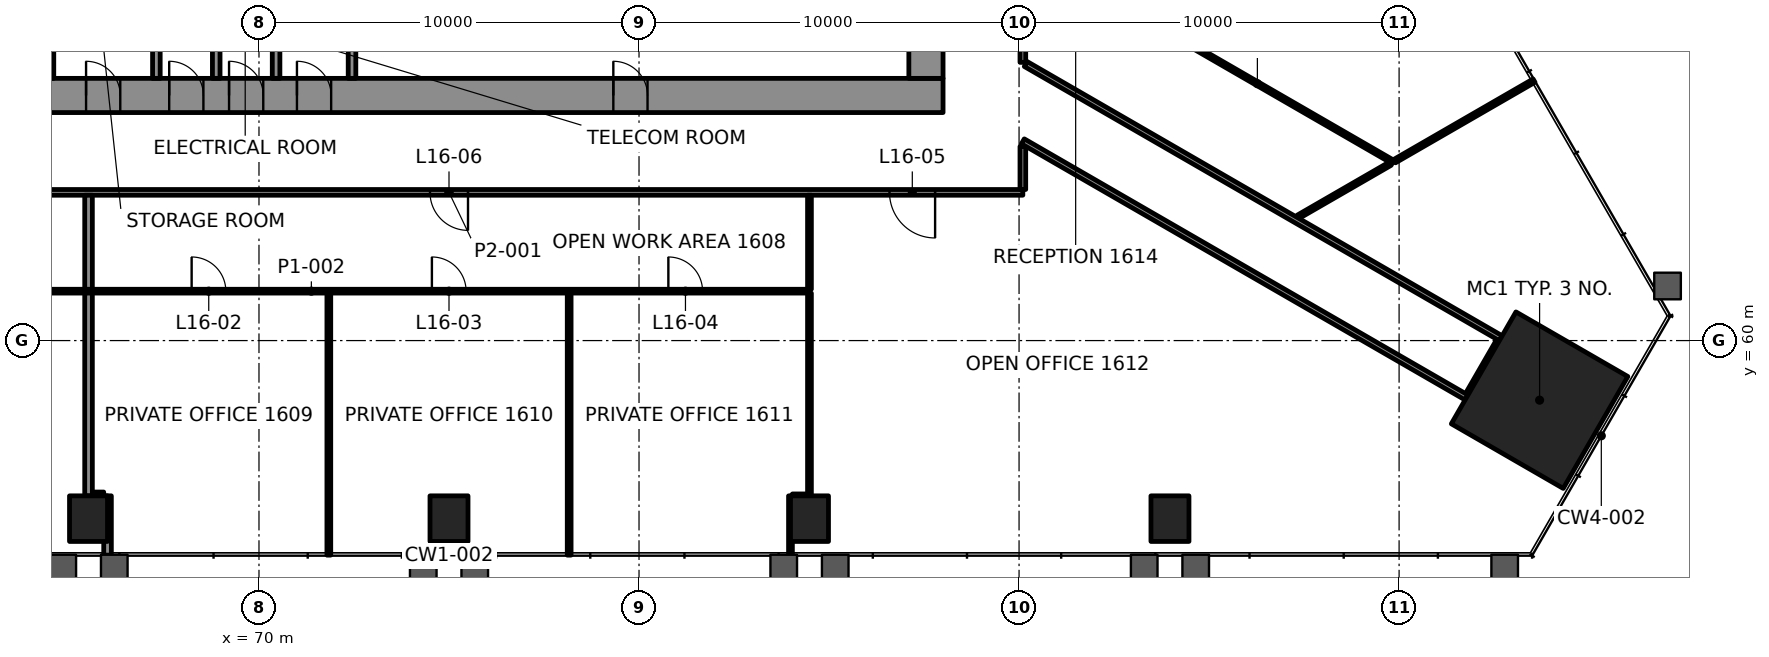
"""IFC4 building model, lengths in metres.
Left out: names, types, materials, properties, quantities, classifications, styles, units other than length and angle.
Written with IfcOpenShell. Run it as: python <this file> out.ifc"""

import sys

from ifc_helpers import new_model, si_unit, direction, frame, frame_2d, origin, origin_2d, place, context, subcontext, project, spatial, rectangle, extrude, element, fill, save


model = new_model("IFC4")
c1 = context("Model", 3, precision=1e-05, world=origin(), true_north=direction((0.0, 1.0)))
c2 = subcontext(c1, "Body", "Model", "MODEL_VIEW")
j1 = project(units=[si_unit("LENGTHUNIT", "METRE"), si_unit("PLANEANGLEUNIT", "RADIAN")], contexts=[c1])
p1 = place(None, origin())
s1 = spatial("IfcSite", under=j1, at=p1, CompositionType="ELEMENT")
p2 = place(p1, origin())
s2 = spatial("IfcBuilding", under=s1, at=p2, CompositionType="ELEMENT")
p3 = place(p2, frame((0.0, 0.0, 73.6)))
s3 = spatial("IfcBuildingStorey", under=s2, at=p3, CompositionType="ELEMENT", Elevation=73.6)
p4 = place(p3, frame((103.697, 58.432, 0.0), z_axis=(0.0, 0.0, 1.0), x_axis=(0.5, 0.866025403784, 0.0)))
e1 = element("IfcColumn", 1, at=p4, inside=s3, PredefinedType="COLUMN", context=c2, shape_type="SweptSolid", body=[
    extrude(rectangle(XDim=3.4, YDim=3.4, at=origin_2d()), origin(), (0.0, 0.0, 1.0), 4.2),
])
for number, where, z_axis, x_axis in (
    (2, (65.515, 55.314, -0.0), (0.0, 0.0, 1.0), (1.0, 0.0, 0.0)),
    (3, (75.0, 55.314, -0.0), (0.0, 0.0, 1.0), (1.0, 0.0, 0.0)),
    (4, (84.485, 55.314, -0.0), (0.0, 0.0, 1.0), (1.0, 0.0, 0.0)),
    (5, (93.971, 55.314, -0.0), (0.0, 0.0, 1.0), (1.0, 0.0, 0.0)),
):
    element("IfcColumn", number, at=place(p3, frame(where, z_axis=z_axis, x_axis=x_axis)), inside=s3, PredefinedType="COLUMN", context=c2, shape_type="SweptSolid", body=[
        extrude(rectangle(XDim=1.0, YDim=1.2, at=origin_2d()), origin(), (0.0, 0.0, 1.0), 4.2),
    ])
p5 = place(p3, frame((62.0, 66.45, 0.0), z_axis=(0.0, 0.0, 1.0), x_axis=(1.0, 0.0, 0.0)))
e6 = element("IfcWall", 6, at=p5, inside=s3, PredefinedType="SHEAR", context=c2, shape_type="SweptSolid", body=[
    extrude(rectangle(XDim=26.0, YDim=0.9, at=frame_2d((13.0, 0.0))), origin(), (0.0, 0.0, 1.0), 4.0),
])
p6 = place(p5, frame((3.45, 0.0, 0.0)))
e7 = element("IfcOpeningElement", 7, at=p6, cuts=e6, PredefinedType="OPENING", context=c2, shape_type="SweptSolid", body=[
    extrude(rectangle(XDim=0.9, YDim=2.1, at=frame_2d((0.45, 1.05))), frame((0.0, 0.46, 0.0), z_axis=(0.0, -1.0, 0.0), x_axis=(1.0, 0.0, 0.0)), (0.0, 0.0, 1.0), 0.92),
])
p7 = place(p5, frame((5.637, 0.0, 0.0)))
e8 = element("IfcOpeningElement", 8, at=p7, cuts=e6, PredefinedType="OPENING", context=c2, shape_type="SweptSolid", body=[
    extrude(rectangle(XDim=0.9, YDim=2.1, at=frame_2d((0.45, 1.05))), frame((0.0, 0.46, 0.0), z_axis=(0.0, -1.0, 0.0), x_axis=(1.0, 0.0, 0.0)), (0.0, 0.0, 1.0), 0.92),
])
p8 = place(p5, frame((7.212, 0.0, 0.0)))
e9 = element("IfcOpeningElement", 9, at=p8, cuts=e6, PredefinedType="OPENING", context=c2, shape_type="SweptSolid", body=[
    extrude(rectangle(XDim=0.9, YDim=2.1, at=frame_2d((0.45, 1.05))), frame((0.0, 0.46, 0.0), z_axis=(0.0, -1.0, 0.0), x_axis=(1.0, 0.0, 0.0)), (0.0, 0.0, 1.0), 0.92),
])
p9 = place(p5, frame((8.999, 0.0, 0.0)))
e10 = element("IfcOpeningElement", 10, at=p9, cuts=e6, PredefinedType="OPENING", context=c2, shape_type="SweptSolid", body=[
    extrude(rectangle(XDim=0.9, YDim=2.1, at=frame_2d((0.45, 1.05))), frame((0.0, 0.46, 0.0), z_axis=(0.0, -1.0, 0.0), x_axis=(1.0, 0.0, 0.0)), (0.0, 0.0, 1.0), 0.92),
])
p10 = place(p5, frame((17.324, 0.0, 0.0)))
e11 = element("IfcOpeningElement", 11, at=p10, cuts=e6, PredefinedType="OPENING", context=c2, shape_type="SweptSolid", body=[
    extrude(rectangle(XDim=0.9, YDim=2.1, at=frame_2d((0.45, 1.05))), frame((0.0, 0.46, 0.0), z_axis=(0.0, -1.0, 0.0), x_axis=(1.0, 0.0, 0.0)), (0.0, 0.0, 1.0), 0.92),
])
p11 = place(p3, frame((87.55, 66.9, 0.0), z_axis=(0.0, 0.0, 1.0), x_axis=(0.0, 1.0, 0.0)))
e12 = element("IfcWall", 12, at=p11, inside=s3, PredefinedType="SHEAR", context=c2, shape_type="SweptSolid", body=[
    extrude(rectangle(XDim=16.2, YDim=0.9, at=frame_2d((8.1, 0.0))), origin(), (0.0, 0.0, 1.0), 4.0),
])
p12 = place(p11, frame((5.5, 0.0, 0.0)))
e13 = element("IfcOpeningElement", 13, at=p12, cuts=e12, PredefinedType="OPENING", context=c2, shape_type="SweptSolid", body=[
    extrude(rectangle(XDim=1.8, YDim=2.1, at=frame_2d((0.9, 1.05))), frame((0.0, 0.46, 0.0), z_axis=(0.0, -1.0, 0.0), x_axis=(1.0, 0.0, 0.0)), (0.0, 0.0, 1.0), 0.92),
])
p13 = place(p11, frame((11.202, 0.0, 0.0)))
e14 = element("IfcOpeningElement", 14, at=p13, cuts=e12, PredefinedType="OPENING", context=c2, shape_type="SweptSolid", body=[
    extrude(rectangle(XDim=0.9, YDim=2.1, at=frame_2d((0.45, 1.05))), frame((0.0, 0.46, 0.0), z_axis=(0.0, -1.0, 0.0), x_axis=(1.0, 0.0, 0.0)), (0.0, 0.0, 1.0), 0.92),
])
p14 = place(p3, frame((65.625, 55.914, 0.0), z_axis=(0.0, 0.0, 1.0), x_axis=(1.0, 0.0, 0.0)))
e15 = element("IfcWall", 15, at=p14, inside=s3, PredefinedType="PARTITIONING", context=c2, shape_type="SweptSolid", body=[
    extrude(rectangle(XDim=0.29, YDim=0.2, at=frame_2d((0.145, 0.0))), origin(), (0.0, 0.0, 1.0), 3.4),
])
p15 = place(p3, frame((84.036, 55.914, 0.0), z_axis=(0.0, 0.0, 1.0), x_axis=(1.0, 0.0, 0.0)))
e16 = element("IfcWall", 16, at=p15, inside=s3, PredefinedType="PARTITIONING", context=c2, shape_type="SweptSolid", body=[
    extrude(rectangle(XDim=0.399, YDim=0.1, at=frame_2d((0.199, 0.0))), origin(), (0.0, 0.0, 1.0), 3.4),
])
p16 = place(p3, frame((58.271, 61.3, 0.0), z_axis=(0.0, 0.0, 1.0), x_axis=(1.0, 0.0, 0.0)))
e17 = element("IfcWall", 17, at=p16, inside=s3, PredefinedType="PARTITIONING", context=c2, shape_type="SweptSolid", body=[
    extrude(rectangle(XDim=26.214, YDim=0.1, at=frame_2d((13.107, 0.0))), origin(), (0.0, 0.0, 1.0), 3.4),
])
p17 = place(p16, frame((3.122, 0.0, 0.0)))
e18 = element("IfcOpeningElement", 18, at=p17, cuts=e17, PredefinedType="OPENING", context=c2, shape_type="SweptSolid", body=[
    extrude(rectangle(XDim=1.2, YDim=2.1, at=frame_2d((0.6, 1.05))), frame((0.0, 0.06, 0.0), z_axis=(0.0, -1.0, 0.0), x_axis=(1.0, 0.0, 0.0)), (0.0, 0.0, 1.0), 0.12),
])
p18 = place(p16, frame((9.957, 0.0, 0.0)))
e19 = element("IfcOpeningElement", 19, at=p18, cuts=e17, PredefinedType="OPENING", context=c2, shape_type="SweptSolid", body=[
    extrude(rectangle(XDim=0.9, YDim=2.1, at=frame_2d((0.45, 1.05))), frame((0.0, 0.06, 0.0), z_axis=(0.0, -1.0, 0.0), x_axis=(1.0, 0.0, 0.0)), (0.0, 0.0, 1.0), 0.12),
])
p19 = place(p16, frame((16.279, 0.0, 0.0)))
e20 = element("IfcOpeningElement", 20, at=p19, cuts=e17, PredefinedType="OPENING", context=c2, shape_type="SweptSolid", body=[
    extrude(rectangle(XDim=0.9, YDim=2.1, at=frame_2d((0.45, 1.05))), frame((0.0, 0.06, 0.0), z_axis=(0.0, -1.0, 0.0), x_axis=(1.0, 0.0, 0.0)), (0.0, 0.0, 1.0), 0.12),
])
p20 = place(p16, frame((22.501, 0.0, 0.0)))
e21 = element("IfcOpeningElement", 21, at=p20, cuts=e17, PredefinedType="OPENING", context=c2, shape_type="SweptSolid", body=[
    extrude(rectangle(XDim=0.9, YDim=2.1, at=frame_2d((0.45, 1.05))), frame((0.0, 0.06, 0.0), z_axis=(0.0, -1.0, 0.0), x_axis=(1.0, 0.0, 0.0)), (0.0, 0.0, 1.0), 0.12),
])
p21 = place(p3, frame((90.099, 63.9, 0.0), z_axis=(0.0, 0.0, 1.0), x_axis=(-1.0, 0.0, 0.0)))
e22 = element("IfcWall", 22, at=p21, inside=s3, PredefinedType="PARTITIONING", context=c2, shape_type="SweptSolid", body=[
    extrude(rectangle(XDim=30.199, YDim=0.15, at=frame_2d((15.1, 0.0))), origin(), (0.0, 0.0, 1.0), 3.4),
])
p22 = place(p21, frame((2.309, 0.0, 0.0)))
e23 = element("IfcOpeningElement", 23, at=p22, cuts=e22, PredefinedType="OPENING", context=c2, shape_type="SweptSolid", body=[
    extrude(rectangle(XDim=1.2, YDim=2.1, at=frame_2d((0.6, 1.05))), frame((0.0, 0.085, 0.0), z_axis=(0.0, -1.0, 0.0), x_axis=(1.0, 0.0, 0.0)), (0.0, 0.0, 1.0), 0.17),
])
p23 = place(p21, frame((14.599, 0.0, 0.0)))
e24 = element("IfcOpeningElement", 24, at=p23, cuts=e22, PredefinedType="OPENING", context=c2, shape_type="SweptSolid", body=[
    extrude(rectangle(XDim=1.0, YDim=2.1, at=frame_2d((0.5, 1.05))), frame((0.0, 0.085, 0.0), z_axis=(0.0, -1.0, 0.0), x_axis=(1.0, 0.0, 0.0)), (0.0, 0.0, 1.0), 0.17),
])
p24 = place(p21, frame((26.791, 0.0, 0.0)))
e25 = element("IfcOpeningElement", 25, at=p24, cuts=e22, PredefinedType="OPENING", context=c2, shape_type="SweptSolid", body=[
    extrude(rectangle(XDim=1.0, YDim=2.1, at=frame_2d((0.5, 1.05))), frame((0.0, 0.085, 0.0), z_axis=(0.0, -1.0, 0.0), x_axis=(1.0, 0.0, 0.0)), (0.0, 0.0, 1.0), 0.17),
])
p25 = place(p3, frame((97.343, 63.256, 0.0), z_axis=(0.0, 0.0, 1.0), x_axis=(0.866028733576, 0.499994232587, 0.0)))
e26 = element("IfcWall", 26, at=p25, inside=s3, PredefinedType="PARTITIONING", context=c2, shape_type="SweptSolid", body=[
    extrude(rectangle(XDim=2.799, YDim=0.1, at=frame_2d((1.4, 0.0))), origin(), (0.0, 0.0, 1.0), 3.4),
])
p26 = place(p3, frame((101.812, 58.568, 0.0), z_axis=(0.0, 0.0, 1.0), x_axis=(0.499944585209, 0.866057395165, 0.0)))
e27 = element("IfcWall", 27, at=p26, inside=s3, PredefinedType="PARTITIONING", context=c2, shape_type="SweptSolid", body=[
    extrude(rectangle(XDim=1.649, YDim=0.15, at=frame_2d((0.825, 0.0))), origin(), (0.0, 0.0, 1.0), 3.247),
])
p27 = place(p3, frame((90.1, 63.976, 0.0), z_axis=(0.0, 0.0, 1.0), x_axis=(0.0, 1.0, 0.0)))
e28 = element("IfcWall", 28, at=p27, inside=s3, PredefinedType="PARTITIONING", context=c2, shape_type="SweptSolid", body=[
    extrude(rectangle(XDim=1.131, YDim=0.15, at=frame_2d((0.565, 0.0))), origin(), (0.0, 0.0, 1.0), 3.247),
])
p28 = place(p3, frame((90.1, 86.099, 0.0), z_axis=(0.0, 0.0, 1.0), x_axis=(0.0, -1.0, 0.0)))
e29 = element("IfcWall", 29, at=p28, inside=s3, PredefinedType="PARTITIONING", context=c2, shape_type="SweptSolid", body=[
    extrude(rectangle(XDim=18.778, YDim=0.15, at=frame_2d((9.389, 0.0))), origin(), (0.0, 0.0, 1.0), 3.4),
])
p29 = place(p28, frame((15.455, 0.0, 0.0)))
e30 = element("IfcOpeningElement", 30, at=p29, cuts=e29, PredefinedType="OPENING", context=c2, shape_type="SweptSolid", body=[
    extrude(rectangle(XDim=1.0, YDim=2.1, at=frame_2d((0.5, 1.05))), frame((0.0, 0.085, 0.0), z_axis=(0.0, -1.0, 0.0), x_axis=(1.0, 0.0, 0.0)), (0.0, 0.0, 1.0), 0.17),
])
p30 = place(p3, frame((84.485, 55.915, 0.0), z_axis=(0.0, 0.0, 1.0), x_axis=(0.0, 1.0, 0.0)))
e31 = element("IfcWall", 31, at=p30, inside=s3, PredefinedType="PARTITIONING", context=c2, shape_type="SweptSolid", body=[
    extrude(rectangle(XDim=5.335, YDim=0.1, at=frame_2d((2.668, 0.0))), origin(), (0.0, 0.0, 1.0), 3.4),
])
p31 = place(p3, frame((83.985, 54.354, 0.0), z_axis=(0.0, 0.0, 1.0), x_axis=(0.0, 1.0, 0.0)))
e32 = element("IfcWall", 32, at=p31, inside=s3, PredefinedType="PARTITIONING", context=c2, shape_type="SweptSolid", body=[
    extrude(rectangle(XDim=1.56, YDim=0.1, at=frame_2d((0.78, 0.0))), origin(), (0.0, 0.0, 1.0), 3.165),
])
for number, where, z_axis, x_axis in (
    (33, (78.162, 54.354, 0.0), (0.0, 0.0, 1.0), (0.0, 1.0, 0.0)),
    (34, (71.838, 54.354, 0.0), (0.0, 0.0, 1.0), (0.0, 1.0, 0.0)),
):
    element("IfcWall", number, at=place(p3, frame(where, z_axis=z_axis, x_axis=x_axis)), inside=s3, PredefinedType="PARTITIONING", context=c2, shape_type="SweptSolid", body=[
        extrude(rectangle(XDim=6.896, YDim=0.1, at=frame_2d((3.448, 0.0))), origin(), (0.0, 0.0, 1.0), 3.165),
    ])
p32 = place(p3, frame((66.015, 54.354, 0.0), z_axis=(0.0, 0.0, 1.0), x_axis=(0.0, 1.0, 0.0)))
e35 = element("IfcWall", 35, at=p32, inside=s3, PredefinedType="PARTITIONING", context=c2, shape_type="SweptSolid", body=[
    extrude(rectangle(XDim=1.56, YDim=0.2, at=frame_2d((0.78, 0.0))), origin(), (0.0, 0.0, 1.0), 3.165),
])
p33 = place(p3, frame((65.515, 55.914, 0.0), z_axis=(0.0, 0.0, 1.0), x_axis=(0.0, 1.0, 0.0)))
e36 = element("IfcWall", 36, at=p33, inside=s3, PredefinedType="PARTITIONING", context=c2, shape_type="SweptSolid", body=[
    extrude(rectangle(XDim=5.336, YDim=0.2, at=frame_2d((2.668, 0.0))), origin(), (0.0, 0.0, 1.0), 3.4),
])
p34 = place(p3, frame((99.842, 64.699, 0.0), z_axis=(0.0, 0.0, 1.0), x_axis=(-0.866022901237, 0.500004334515, 0.0)))
e37 = element("IfcWall", 37, at=p34, inside=s3, PredefinedType="PARTITIONING", context=c2, shape_type="SweptSolid", body=[
    extrude(rectangle(XDim=8.247, YDim=0.1, at=frame_2d((4.124, 0.0))), origin(), (0.0, 0.0, 1.0), 3.4),
])
p35 = place(p3, frame((102.674, 60.062, 0.0), z_axis=(0.0, 0.0, 1.0), x_axis=(-0.866022486604, 0.50000505267, 0.0)))
e38 = element("IfcWall", 38, at=p35, inside=s3, PredefinedType="PARTITIONING", context=c2, shape_type="SweptSolid", body=[
    extrude(rectangle(XDim=14.433, YDim=0.15, at=frame_2d((7.216, 0.0))), origin(), (0.0, 0.0, 1.0), 3.4),
])
p36 = place(p3, frame((101.774, 58.503, 0.0), z_axis=(0.0, 0.0, 1.0), x_axis=(-0.866023326939, 0.500003597184, 0.0)))
e39 = element("IfcWall", 39, at=p36, inside=s3, PredefinedType="PARTITIONING", context=c2, shape_type="SweptSolid", body=[
    extrude(rectangle(XDim=13.48, YDim=0.15, at=frame_2d((6.74, 0.0))), origin(), (0.0, 0.0, 1.0), 3.247),
])
p37 = place(p3, frame((84.485, 61.35, 0.0), z_axis=(0.0, 0.0, 1.0), x_axis=(0.0, 1.0, 0.0)))
e40 = element("IfcWall", 40, at=p37, inside=s3, PredefinedType="PARTITIONING", context=c2, shape_type="SweptSolid", body=[
    extrude(rectangle(XDim=2.475, YDim=0.1, at=frame_2d((1.237, 0.0))), origin(), (0.0, 0.0, 1.0), 3.4),
])
p38 = place(p3, frame((99.879, 64.721, 0.0), z_axis=(0.0, 0.0, 1.0), x_axis=(0.866030225258, 0.499991648869, 0.0)))
e41 = element("IfcWall", 41, at=p38, inside=s3, PredefinedType="PARTITIONING", context=c2, shape_type="SweptSolid", body=[
    extrude(rectangle(XDim=4.239, YDim=0.1, at=frame_2d((2.12, 0.0))), origin(), (0.0, 0.0, 1.0), 3.4),
])
p39 = place(p3, frame((65.515, 61.35, 0.0), z_axis=(0.0, 0.0, 1.0), x_axis=(0.0, 1.0, 0.0)))
e42 = element("IfcWall", 42, at=p39, inside=s3, PredefinedType="PARTITIONING", context=c2, shape_type="SweptSolid", body=[
    extrude(rectangle(XDim=2.475, YDim=0.2, at=frame_2d((1.237, 0.0))), origin(), (0.0, 0.0, 1.0), 3.4),
])
for number, where, z_axis, x_axis in (
    (43, (64.5, 66.9, 0.0), (0.0, 0.0, 1.0), (0.0, 1.0, 0.0)),
    (44, (67.3, 66.9, 0.0), (0.0, 0.0, 1.0), (0.0, 1.0, 0.0)),
):
    element("IfcWall", number, at=place(p3, frame(where, z_axis=z_axis, x_axis=x_axis)), inside=s3, PredefinedType="PARTITIONING", context=c2, shape_type="SweptSolid", body=[
        extrude(rectangle(XDim=1.8, YDim=0.2, at=frame_2d((0.9, 0.0))), origin(), (0.0, 0.0, 1.0), 4.0),
    ])
p40 = place(p3, frame((68.875, 66.9, 0.0), z_axis=(0.0, 0.0, 1.0), x_axis=(0.0, 1.0, 0.0)))
e45 = element("IfcWall", 45, at=p40, inside=s3, PredefinedType="PARTITIONING", context=c2, shape_type="SweptSolid", body=[
    extrude(rectangle(XDim=4.75, YDim=0.2, at=frame_2d((2.375, 0.0))), origin(), (0.0, 0.0, 1.0), 4.0),
])
for number, where, z_axis, x_axis in (
    (46, (70.45, 66.9, 0.0), (0.0, 0.0, 1.0), (0.0, 1.0, 0.0)),
    (47, (72.448, 66.9, 0.0), (0.0, 0.0, 1.0), (0.0, 1.0, 0.0)),
):
    element("IfcWall", number, at=place(p3, frame(where, z_axis=z_axis, x_axis=x_axis)), inside=s3, PredefinedType="PARTITIONING", context=c2, shape_type="SweptSolid", body=[
        extrude(rectangle(XDim=1.8, YDim=0.2, at=frame_2d((0.9, 0.0))), origin(), (0.0, 0.0, 1.0), 4.0),
    ])
p41 = place(p18, origin())
e48 = element("IfcDoor", 48, at=p41, inside=s3, OperationType="SINGLE_SWING_RIGHT", PredefinedType="DOOR", context=c2, shape_type="SweptSolid", body=[
    extrude(rectangle(XDim=0.9, YDim=2.1, at=frame_2d((0.45, 1.05))), frame((0.0, 0.025, 0.0), z_axis=(0.0, -1.0, 0.0), x_axis=(1.0, 0.0, 0.0)), (0.0, 0.0, 1.0), 0.05),
])
fill(e19, e48)
p42 = place(p19, origin())
e49 = element("IfcDoor", 49, at=p42, inside=s3, OperationType="SINGLE_SWING_LEFT", PredefinedType="DOOR", context=c2, shape_type="SweptSolid", body=[
    extrude(rectangle(XDim=0.9, YDim=2.1, at=frame_2d((0.45, 1.05))), frame((0.0, 0.025, 0.0), z_axis=(0.0, -1.0, 0.0), x_axis=(1.0, 0.0, 0.0)), (0.0, 0.0, 1.0), 0.05),
])
fill(e20, e49)
p43 = place(p20, origin())
e50 = element("IfcDoor", 50, at=p43, inside=s3, OperationType="SINGLE_SWING_RIGHT", PredefinedType="DOOR", context=c2, shape_type="SweptSolid", body=[
    extrude(rectangle(XDim=0.9, YDim=2.1, at=frame_2d((0.45, 1.05))), frame((0.0, 0.025, 0.0), z_axis=(0.0, -1.0, 0.0), x_axis=(1.0, 0.0, 0.0)), (0.0, 0.0, 1.0), 0.05),
])
fill(e21, e50)
p44 = place(p22, origin())
e51 = element("IfcDoor", 51, at=p44, inside=s3, OperationType="DOUBLE_DOOR_SINGLE_SWING", PredefinedType="DOOR", context=c2, shape_type="SweptSolid", body=[
    extrude(rectangle(XDim=1.2, YDim=2.1, at=frame_2d((0.6, 1.05))), frame((0.0, 0.025, 0.0), z_axis=(0.0, -1.0, 0.0), x_axis=(1.0, 0.0, 0.0)), (0.0, 0.0, 1.0), 0.05),
])
fill(e23, e51)
p45 = place(p23, origin())
e52 = element("IfcDoor", 52, at=p45, inside=s3, OperationType="SINGLE_SWING_RIGHT", PredefinedType="DOOR", context=c2, shape_type="SweptSolid", body=[
    extrude(rectangle(XDim=1.0, YDim=2.1, at=frame_2d((0.5, 1.05))), frame((0.0, 0.025, 0.0), z_axis=(0.0, -1.0, 0.0), x_axis=(1.0, 0.0, 0.0)), (0.0, 0.0, 1.0), 0.05),
])
fill(e24, e52)
p46 = place(p6, origin())
e53 = element("IfcDoor", 53, at=p46, inside=s3, OperationType="SINGLE_SWING_LEFT", PredefinedType="DOOR", context=c2, shape_type="SweptSolid", body=[
    extrude(rectangle(XDim=0.9, YDim=2.1, at=frame_2d((0.45, 1.05))), frame((0.0, 0.17, 0.0), z_axis=(0.0, -1.0, 0.0), x_axis=(1.0, 0.0, 0.0)), (0.0, 0.0, 1.0), 0.34),
])
fill(e7, e53)
p47 = place(p7, origin())
e54 = element("IfcDoor", 54, at=p47, inside=s3, OperationType="SINGLE_SWING_RIGHT", PredefinedType="DOOR", context=c2, shape_type="SweptSolid", body=[
    extrude(rectangle(XDim=0.9, YDim=2.1, at=frame_2d((0.45, 1.05))), frame((0.0, 0.17, 0.0), z_axis=(0.0, -1.0, 0.0), x_axis=(1.0, 0.0, 0.0)), (0.0, 0.0, 1.0), 0.34),
])
fill(e8, e54)
p48 = place(p8, origin())
e55 = element("IfcDoor", 55, at=p48, inside=s3, OperationType="SINGLE_SWING_LEFT", PredefinedType="DOOR", context=c2, shape_type="SweptSolid", body=[
    extrude(rectangle(XDim=0.9, YDim=2.1, at=frame_2d((0.45, 1.05))), frame((0.0, 0.17, 0.0), z_axis=(0.0, -1.0, 0.0), x_axis=(1.0, 0.0, 0.0)), (0.0, 0.0, 1.0), 0.34),
])
fill(e9, e55)
p49 = place(p9, origin())
e56 = element("IfcDoor", 56, at=p49, inside=s3, OperationType="SINGLE_SWING_RIGHT", PredefinedType="DOOR", context=c2, shape_type="SweptSolid", body=[
    extrude(rectangle(XDim=0.9, YDim=2.1, at=frame_2d((0.45, 1.05))), frame((0.0, 0.17, 0.0), z_axis=(0.0, -1.0, 0.0), x_axis=(1.0, 0.0, 0.0)), (0.0, 0.0, 1.0), 0.34),
])
fill(e10, e56)
p50 = place(p10, origin())
e57 = element("IfcDoor", 57, at=p50, inside=s3, OperationType="SINGLE_SWING_LEFT", PredefinedType="DOOR", context=c2, shape_type="SweptSolid", body=[
    extrude(rectangle(XDim=0.9, YDim=2.1, at=frame_2d((0.45, 1.05))), frame((0.0, 0.17, 0.0), z_axis=(0.0, -1.0, 0.0), x_axis=(1.0, 0.0, 0.0)), (0.0, 0.0, 1.0), 0.34),
])
fill(e11, e57)
save(model, sys.argv[1])
